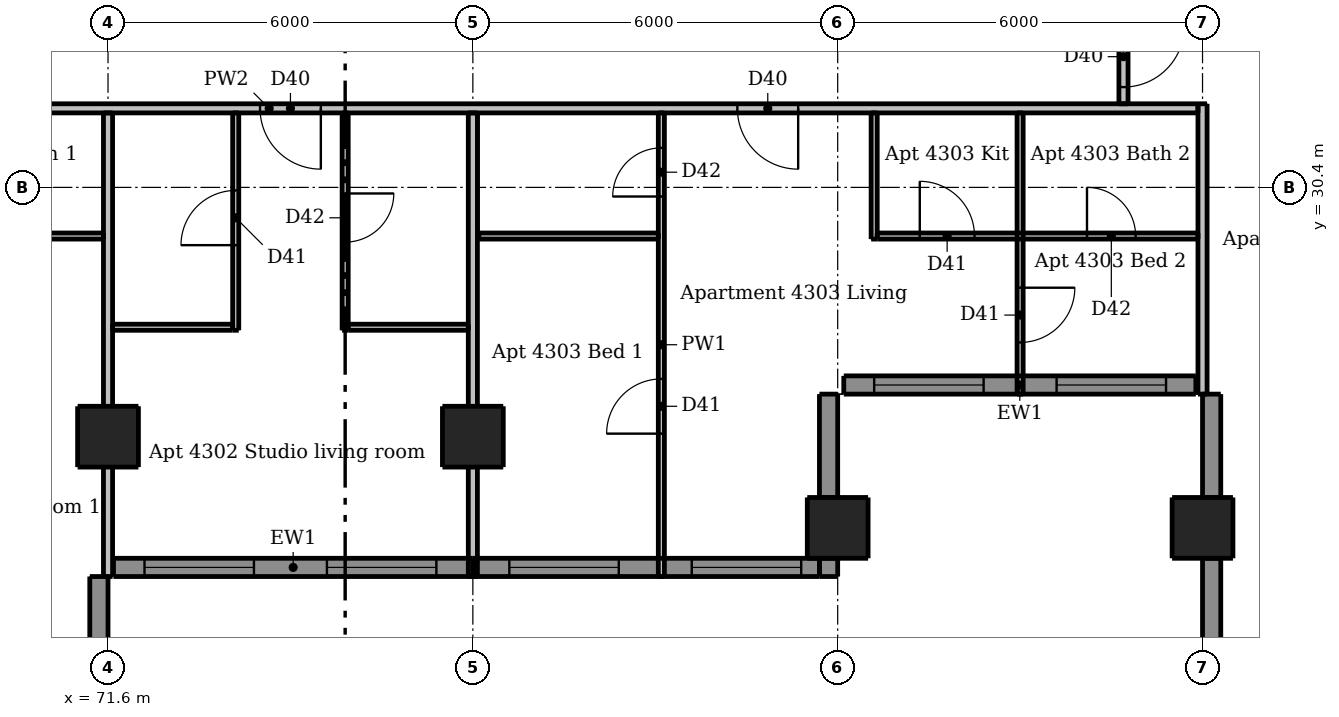
"""IFC4 building model, lengths in metres.
Left out: names, types, materials, properties, quantities, classifications, styles, units other than length and angle.
Written with IfcOpenShell. Run it as: python <this file> out.ifc"""

import sys

from ifc_helpers import new_model, si_unit, direction, frame, frame_2d, origin, origin_2d, place, context, subcontext, project, spatial, rectangle, extrude, element, fill, save


model = new_model("IFC4")
c1 = context("Model", 3, precision=1e-05, world=origin(), true_north=direction((0.0, 1.0)))
c2 = subcontext(c1, "Body", "Model", "MODEL_VIEW")
j1 = project(units=[si_unit("LENGTHUNIT", "METRE"), si_unit("PLANEANGLEUNIT", "RADIAN")], contexts=[c1])
p1 = place(None, origin())
s1 = spatial("IfcSite", under=j1, at=p1, CompositionType="ELEMENT")
p2 = place(p1, origin())
s2 = spatial("IfcBuilding", under=s1, at=p2, CompositionType="ELEMENT")
p3 = place(p2, frame((0.0, 0.0, 161.5)))
s3 = spatial("IfcBuildingStorey", under=s2, at=p3, CompositionType="ELEMENT", Elevation=161.5)
for number, where, z_axis, x_axis in (
    (1, (71.6, 26.3, 0.0), (0.0, 0.0, 1.0), (1.0, 0.0, 0.0)),
    (2, (77.6, 26.3, 0.0), (0.0, 0.0, 1.0), (1.0, 0.0, 0.0)),
):
    element("IfcColumn", number, at=place(p3, frame(where, z_axis=z_axis, x_axis=x_axis)), inside=s3, PredefinedType="COLUMN", context=c2, shape_type="SweptSolid", body=[
        extrude(rectangle(XDim=1.0, YDim=1.0, at=origin_2d()), origin(), (0.0, 0.0, 1.0), 3.05),
    ])
p4 = place(p3, frame((83.6, 24.8, 0.0), z_axis=(0.0, 0.0, 1.0), x_axis=(1.0, 0.0, 0.0)))
e3 = element("IfcColumn", 3, at=p4, inside=s3, PredefinedType="COLUMN", context=c2, shape_type="SweptSolid", body=[
    extrude(rectangle(XDim=1.0, YDim=1.0, at=origin_2d()), origin(), (0.0, 0.0, 1.0), 3.3),
])
p5 = place(p3, frame((89.6, 24.8, 0.0), z_axis=(0.0, 0.0, 1.0), x_axis=(1.0, 0.0, 0.0)))
e4 = element("IfcColumn", 4, at=p5, inside=s3, PredefinedType="COLUMN", context=c2, shape_type="SweptSolid", body=[
    extrude(rectangle(XDim=1.0, YDim=1.0, at=origin_2d()), origin(), (0.0, 0.0, 1.0), 3.05),
])
p6 = place(p3, frame((71.45, 22.5, 0.0), z_axis=(0.0, 0.0, 1.0), x_axis=(0.0, 1.0, 0.0)))
e5 = element("IfcWall", 5, at=p6, inside=s3, PredefinedType="SOLIDWALL", context=c2, shape_type="SweptSolid", body=[
    extrude(rectangle(XDim=1.5, YDim=0.3, at=frame_2d((0.75, 0.0))), origin(), (0.0, 0.0, 1.0), 3.05),
])
p7 = place(p3, frame((83.45, 24.0, 0.0), z_axis=(0.0, 0.0, 1.0), x_axis=(0.0, 1.0, 0.0)))
e6 = element("IfcWall", 6, at=p7, inside=s3, PredefinedType="SOLIDWALL", context=c2, shape_type="SweptSolid", body=[
    extrude(rectangle(XDim=0.3, YDim=0.3, at=frame_2d((0.15, 0.0))), origin(), (0.0, 0.0, 1.0), 3.05),
])
for number, where, z_axis, x_axis in (
    (7, (83.45, 25.3, 0.0), (0.0, 0.0, 1.0), (0.0, 1.0, 0.0)),
    (8, (89.75, 27.0, 0.0), (0.0, 0.0, 1.0), (0.0, -1.0, 0.0)),
):
    element("IfcWall", number, at=place(p3, frame(where, z_axis=z_axis, x_axis=x_axis)), inside=s3, PredefinedType="SOLIDWALL", context=c2, shape_type="SweptSolid", body=[
        extrude(rectangle(XDim=1.7, YDim=0.3, at=frame_2d((0.85, 0.0))), origin(), (0.0, 0.0, 1.0), 3.05),
    ])
p8 = place(p3, frame((89.75, 24.3, 0.0), z_axis=(0.0, 0.0, 1.0), x_axis=(0.0, -1.0, 0.0)))
e9 = element("IfcWall", 9, at=p8, inside=s3, PredefinedType="SOLIDWALL", context=c2, shape_type="SweptSolid", body=[
    extrude(rectangle(XDim=1.8, YDim=0.3, at=frame_2d((0.9, 0.0))), origin(), (0.0, 0.0, 1.0), 3.05),
])
p9 = place(p3, frame((71.69, 24.15, 0.0), z_axis=(0.0, 0.0, 1.0), x_axis=(1.0, 0.0, 0.0)))
e10 = element("IfcWall", 10, at=p9, inside=s3, PredefinedType="SOLIDWALL", context=c2, shape_type="SweptSolid", body=[
    extrude(rectangle(XDim=5.91, YDim=0.3, at=frame_2d((2.955, 0.0))), origin(), (0.0, 0.0, 1.0), 3.05),
])
p10 = place(p9, frame((0.51, 0.0, 0.15)))
e11 = element("IfcOpeningElement", 11, at=p10, cuts=e10, PredefinedType="OPENING", context=c2, shape_type="SweptSolid", body=[
    extrude(rectangle(XDim=1.8, YDim=2.1, at=frame_2d((0.9, 1.05))), frame((0.0, 0.16, 0.0), z_axis=(0.0, -1.0, 0.0), x_axis=(1.0, 0.0, 0.0)), (0.0, 0.0, 1.0), 0.32),
])
p11 = place(p9, frame((3.51, 0.0, 0.15)))
e12 = element("IfcOpeningElement", 12, at=p11, cuts=e10, PredefinedType="OPENING", context=c2, shape_type="SweptSolid", body=[
    extrude(rectangle(XDim=1.8, YDim=2.1, at=frame_2d((0.9, 1.05))), frame((0.0, 0.16, 0.0), z_axis=(0.0, -1.0, 0.0), x_axis=(1.0, 0.0, 0.0)), (0.0, 0.0, 1.0), 0.32),
])
p12 = place(p3, frame((77.6, 24.15, 0.0), z_axis=(0.0, 0.0, 1.0), x_axis=(1.0, 0.0, 0.0)))
e13 = element("IfcWall", 13, at=p12, inside=s3, PredefinedType="SOLIDWALL", context=c2, shape_type="SweptSolid", body=[
    extrude(rectangle(XDim=5.7, YDim=0.3, at=frame_2d((2.85, 0.0))), origin(), (0.0, 0.0, 1.0), 3.05),
])
p13 = place(p12, frame((0.6, 0.0, 0.15)))
e14 = element("IfcOpeningElement", 14, at=p13, cuts=e13, PredefinedType="OPENING", context=c2, shape_type="SweptSolid", body=[
    extrude(rectangle(XDim=1.8, YDim=2.1, at=frame_2d((0.9, 1.05))), frame((0.0, 0.16, 0.0), z_axis=(0.0, -1.0, 0.0), x_axis=(1.0, 0.0, 0.0)), (0.0, 0.0, 1.0), 0.32),
])
p14 = place(p12, frame((3.6, 0.0, 0.15)))
e15 = element("IfcOpeningElement", 15, at=p14, cuts=e13, PredefinedType="OPENING", context=c2, shape_type="SweptSolid", body=[
    extrude(rectangle(XDim=1.8, YDim=2.1, at=frame_2d((0.9, 1.05))), frame((0.0, 0.16, 0.0), z_axis=(0.0, -1.0, 0.0), x_axis=(1.0, 0.0, 0.0)), (0.0, 0.0, 1.0), 0.32),
])
p15 = place(p3, frame((83.7, 27.15, 0.0), z_axis=(0.0, 0.0, 1.0), x_axis=(1.0, 0.0, 0.0)))
e16 = element("IfcWall", 16, at=p15, inside=s3, PredefinedType="SOLIDWALL", context=c2, shape_type="SweptSolid", body=[
    extrude(rectangle(XDim=5.79, YDim=0.3, at=frame_2d((2.895, 0.0))), origin(), (0.0, 0.0, 1.0), 3.05),
])
p16 = place(p15, frame((0.5, 0.0, 0.15)))
e17 = element("IfcOpeningElement", 17, at=p16, cuts=e16, PredefinedType="OPENING", context=c2, shape_type="SweptSolid", body=[
    extrude(rectangle(XDim=1.8, YDim=2.1, at=frame_2d((0.9, 1.05))), frame((0.0, 0.16, 0.0), z_axis=(0.0, -1.0, 0.0), x_axis=(1.0, 0.0, 0.0)), (0.0, 0.0, 1.0), 0.32),
])
p17 = place(p15, frame((3.5, 0.0, 0.15)))
e18 = element("IfcOpeningElement", 18, at=p17, cuts=e16, PredefinedType="OPENING", context=c2, shape_type="SweptSolid", body=[
    extrude(rectangle(XDim=1.8, YDim=2.1, at=frame_2d((0.9, 1.05))), frame((0.0, 0.16, 0.0), z_axis=(0.0, -1.0, 0.0), x_axis=(1.0, 0.0, 0.0)), (0.0, 0.0, 1.0), 0.32),
])
p18 = place(p3, frame((73.7, 28.05, 0.0), z_axis=(0.0, 0.0, 1.0), x_axis=(0.0, 1.0, 0.0)))
e19 = element("IfcWall", 19, at=p18, inside=s3, PredefinedType="PARTITIONING", context=c2, shape_type="SweptSolid", body=[
    extrude(rectangle(XDim=3.575, YDim=0.1, at=frame_2d((1.788, 0.0))), origin(), (0.0, 0.0, 1.0), 3.05),
])
p19 = place(p18, frame((1.4, 0.0, 0.0)))
e20 = element("IfcOpeningElement", 20, at=p19, cuts=e19, PredefinedType="OPENING", context=c2, shape_type="SweptSolid", body=[
    extrude(rectangle(XDim=0.9, YDim=2.1, at=frame_2d((0.45, 1.05))), frame((0.0, 0.06, 0.0), z_axis=(0.0, -1.0, 0.0), x_axis=(1.0, 0.0, 0.0)), (0.0, 0.0, 1.0), 0.12),
])
p20 = place(p3, frame((75.5, 31.625, 0.0), z_axis=(0.0, 0.0, 1.0), x_axis=(0.0, -1.0, 0.0)))
e21 = element("IfcWall", 21, at=p20, inside=s3, PredefinedType="PARTITIONING", context=c2, shape_type="SweptSolid", body=[
    extrude(rectangle(XDim=3.575, YDim=0.1, at=frame_2d((1.788, 0.0))), origin(), (0.0, 0.0, 1.0), 3.05),
])
p21 = place(p20, frame((1.325, 0.0, 0.0)))
e22 = element("IfcOpeningElement", 22, at=p21, cuts=e21, PredefinedType="OPENING", context=c2, shape_type="SweptSolid", body=[
    extrude(rectangle(XDim=0.8, YDim=2.1, at=frame_2d((0.4, 1.05))), frame((0.0, 0.06, 0.0), z_axis=(0.0, -1.0, 0.0), x_axis=(1.0, 0.0, 0.0)), (0.0, 0.0, 1.0), 0.12),
])
p22 = place(p3, frame((80.7, 24.0, 0.0), z_axis=(0.0, 0.0, 1.0), x_axis=(0.0, 1.0, 0.0)))
e23 = element("IfcWall", 23, at=p22, inside=s3, PredefinedType="PARTITIONING", context=c2, shape_type="SweptSolid", body=[
    extrude(rectangle(XDim=7.625, YDim=0.1, at=frame_2d((3.812, 0.0))), origin(), (0.0, 0.0, 1.0), 3.05),
])
p23 = place(p22, frame((2.35, 0.0, 0.0)))
e24 = element("IfcOpeningElement", 24, at=p23, cuts=e23, PredefinedType="OPENING", context=c2, shape_type="SweptSolid", body=[
    extrude(rectangle(XDim=0.9, YDim=2.1, at=frame_2d((0.45, 1.05))), frame((0.0, 0.06, 0.0), z_axis=(0.0, -1.0, 0.0), x_axis=(1.0, 0.0, 0.0)), (0.0, 0.0, 1.0), 0.12),
])
p24 = place(p22, frame((6.25, 0.0, 0.0)))
e25 = element("IfcOpeningElement", 25, at=p24, cuts=e23, PredefinedType="OPENING", context=c2, shape_type="SweptSolid", body=[
    extrude(rectangle(XDim=0.8, YDim=2.1, at=frame_2d((0.4, 1.05))), frame((0.0, 0.06, 0.0), z_axis=(0.0, -1.0, 0.0), x_axis=(1.0, 0.0, 0.0)), (0.0, 0.0, 1.0), 0.12),
])
p25 = place(p3, frame((84.2, 29.55, 0.0), z_axis=(0.0, 0.0, 1.0), x_axis=(0.0, 1.0, 0.0)))
e26 = element("IfcWall", 26, at=p25, inside=s3, PredefinedType="PARTITIONING", context=c2, shape_type="SweptSolid", body=[
    extrude(rectangle(XDim=2.075, YDim=0.1, at=frame_2d((1.038, 0.0))), origin(), (0.0, 0.0, 1.0), 3.05),
])
p26 = place(p3, frame((86.6, 31.625, 0.0), z_axis=(0.0, 0.0, 1.0), x_axis=(0.0, -1.0, 0.0)))
e27 = element("IfcWall", 27, at=p26, inside=s3, PredefinedType="PARTITIONING", context=c2, shape_type="SweptSolid", body=[
    extrude(rectangle(XDim=4.625, YDim=0.1, at=frame_2d((2.312, 0.0))), origin(), (0.0, 0.0, 1.0), 3.05),
])
p27 = place(p26, frame((2.875, 0.0, 0.0)))
e28 = element("IfcOpeningElement", 28, at=p27, cuts=e27, PredefinedType="OPENING", context=c2, shape_type="SweptSolid", body=[
    extrude(rectangle(XDim=0.9, YDim=2.1, at=frame_2d((0.45, 1.05))), frame((0.0, 0.06, 0.0), z_axis=(0.0, -1.0, 0.0), x_axis=(1.0, 0.0, 0.0)), (0.0, 0.0, 1.0), 0.12),
])
p28 = place(p3, frame((65.65, 29.6, 0.0), z_axis=(0.0, 0.0, 1.0), x_axis=(1.0, 0.0, 0.0)))
e29 = element("IfcWall", 29, at=p28, inside=s3, PredefinedType="PARTITIONING", context=c2, shape_type="SweptSolid", body=[
    extrude(rectangle(XDim=5.875, YDim=0.1, at=frame_2d((2.938, 0.0))), origin(), (0.0, 0.0, 1.0), 3.05),
])
p29 = place(p28, frame((3.75, 0.0, 0.0)))
e30 = element("IfcOpeningElement", 30, at=p29, cuts=e29, PredefinedType="OPENING", context=c2, shape_type="SweptSolid", body=[
    extrude(rectangle(XDim=0.8, YDim=2.1, at=frame_2d((0.4, 1.05))), frame((0.0, 0.06, 0.0), z_axis=(0.0, -1.0, 0.0), x_axis=(1.0, 0.0, 0.0)), (0.0, 0.0, 1.0), 0.12),
])
p30 = place(p3, frame((77.7, 29.6, 0.0), z_axis=(0.0, 0.0, 1.0), x_axis=(1.0, 0.0, 0.0)))
e31 = element("IfcWall", 31, at=p30, inside=s3, PredefinedType="PARTITIONING", context=c2, shape_type="SweptSolid", body=[
    extrude(rectangle(XDim=2.95, YDim=0.1, at=frame_2d((1.475, 0.0))), origin(), (0.0, 0.0, 1.0), 3.05),
])
p31 = place(p3, frame((84.25, 29.6, 0.0), z_axis=(0.0, 0.0, 1.0), x_axis=(1.0, 0.0, 0.0)))
e32 = element("IfcWall", 32, at=p31, inside=s3, PredefinedType="PARTITIONING", context=c2, shape_type="SweptSolid", body=[
    extrude(rectangle(XDim=5.275, YDim=0.1, at=frame_2d((2.637, 0.0))), origin(), (0.0, 0.0, 1.0), 3.05),
])
p32 = place(p31, frame((0.7, 0.0, 0.0)))
e33 = element("IfcOpeningElement", 33, at=p32, cuts=e32, PredefinedType="OPENING", context=c2, shape_type="SweptSolid", body=[
    extrude(rectangle(XDim=0.9, YDim=2.1, at=frame_2d((0.45, 1.05))), frame((0.0, 0.06, 0.0), z_axis=(0.0, -1.0, 0.0), x_axis=(1.0, 0.0, 0.0)), (0.0, 0.0, 1.0), 0.12),
])
p33 = place(p31, frame((3.45, 0.0, 0.0)))
e34 = element("IfcOpeningElement", 34, at=p33, cuts=e32, PredefinedType="OPENING", context=c2, shape_type="SweptSolid", body=[
    extrude(rectangle(XDim=0.8, YDim=2.1, at=frame_2d((0.4, 1.05))), frame((0.0, 0.06, 0.0), z_axis=(0.0, -1.0, 0.0), x_axis=(1.0, 0.0, 0.0)), (0.0, 0.0, 1.0), 0.12),
])
for number, where, z_axis, x_axis in (
    (35, (71.675, 28.1, 0.0), (0.0, 0.0, 1.0), (1.0, 0.0, 0.0)),
    (36, (75.55, 28.1, 0.0), (0.0, 0.0, 1.0), (1.0, 0.0, 0.0)),
):
    element("IfcWall", number, at=place(p3, frame(where, z_axis=z_axis, x_axis=x_axis)), inside=s3, PredefinedType="PARTITIONING", context=c2, shape_type="SweptSolid", body=[
        extrude(rectangle(XDim=1.975, YDim=0.1, at=frame_2d((0.987, 0.0))), origin(), (0.0, 0.0, 1.0), 3.05),
    ])
for number, where, z_axis, x_axis in (
    (37, (71.6, 24.0, 0.0), (0.0, 0.0, 1.0), (0.0, 1.0, 0.0)),
    (38, (77.6, 24.0, 0.0), (0.0, 0.0, 1.0), (0.0, 1.0, 0.0)),
):
    element("IfcWall", number, at=place(p3, frame(where, z_axis=z_axis, x_axis=x_axis)), inside=s3, PredefinedType="PARTITIONING", context=c2, shape_type="SweptSolid", body=[
        extrude(rectangle(XDim=7.625, YDim=0.15, at=frame_2d((3.812, 0.0))), origin(), (0.0, 0.0, 1.0), 2.59),
    ])
p34 = place(p3, frame((88.3, 61.175, 0.0), z_axis=(0.0, 0.0, 1.0), x_axis=(0.0, -1.0, 0.0)))
e39 = element("IfcWall", 39, at=p34, inside=s3, PredefinedType="PARTITIONING", context=c2, shape_type="SweptSolid", body=[
    extrude(rectangle(XDim=29.4, YDim=0.15, at=frame_2d((14.7, 0.0))), origin(), (0.0, 0.0, 1.0), 3.05),
])
p35 = place(p34, frame((28.125, 0.0, 0.0)))
e40 = element("IfcOpeningElement", 40, at=p35, cuts=e39, PredefinedType="OPENING", context=c2, shape_type="SweptSolid", body=[
    extrude(rectangle(XDim=1.0, YDim=2.1, at=frame_2d((0.5, 1.05))), frame((0.0, 0.085, 0.0), z_axis=(0.0, -1.0, 0.0), x_axis=(1.0, 0.0, 0.0)), (0.0, 0.0, 1.0), 0.17),
])
p36 = place(p34, frame((18.275, 0.0, 0.0)))
e41 = element("IfcOpeningElement", 41, at=p36, cuts=e39, PredefinedType="OPENING", context=c2, shape_type="SweptSolid", body=[
    extrude(rectangle(XDim=1.0, YDim=2.1, at=frame_2d((0.5, 1.05))), frame((0.0, 0.085, 0.0), z_axis=(0.0, -1.0, 0.0), x_axis=(1.0, 0.0, 0.0)), (0.0, 0.0, 1.0), 0.17),
])
p37 = place(p34, frame((10.475, 0.0, 0.0)))
e42 = element("IfcOpeningElement", 42, at=p37, cuts=e39, PredefinedType="OPENING", context=c2, shape_type="SweptSolid", body=[
    extrude(rectangle(XDim=1.0, YDim=2.1, at=frame_2d((0.5, 1.05))), frame((0.0, 0.085, 0.0), z_axis=(0.0, -1.0, 0.0), x_axis=(1.0, 0.0, 0.0)), (0.0, 0.0, 1.0), 0.17),
])
p38 = place(p34, frame((3.275, 0.0, 0.0)))
e43 = element("IfcOpeningElement", 43, at=p38, cuts=e39, PredefinedType="OPENING", context=c2, shape_type="SweptSolid", body=[
    extrude(rectangle(XDim=1.0, YDim=2.1, at=frame_2d((0.5, 1.05))), frame((0.0, 0.085, 0.0), z_axis=(0.0, -1.0, 0.0), x_axis=(1.0, 0.0, 0.0)), (0.0, 0.0, 1.0), 0.17),
])
p39 = place(p3, frame((89.6, 27.0, 0.0), z_axis=(0.0, 0.0, 1.0), x_axis=(0.0, 1.0, 0.0)))
e44 = element("IfcWall", 44, at=p39, inside=s3, PredefinedType="PARTITIONING", context=c2, shape_type="SweptSolid", body=[
    extrude(rectangle(XDim=4.775, YDim=0.15, at=frame_2d((2.387, 0.0))), origin(), (0.0, 0.0, 1.0), 2.51),
])
p40 = place(p3, frame((89.525, 31.7, 0.0), z_axis=(0.0, 0.0, 1.0), x_axis=(-1.0, 0.0, 0.0)))
e45 = element("IfcWall", 45, at=p40, inside=s3, PredefinedType="PARTITIONING", context=c2, shape_type="SweptSolid", body=[
    extrude(rectangle(XDim=30.55, YDim=0.15, at=frame_2d((15.275, 0.0))), origin(), (0.0, 0.0, 1.0), 3.05),
])
p41 = place(p40, frame((26.775, 0.0, 0.0)))
e46 = element("IfcOpeningElement", 46, at=p41, cuts=e45, PredefinedType="OPENING", context=c2, shape_type="SweptSolid", body=[
    extrude(rectangle(XDim=1.0, YDim=2.1, at=frame_2d((0.5, 1.05))), frame((0.0, 0.085, 0.0), z_axis=(0.0, -1.0, 0.0), x_axis=(1.0, 0.0, 0.0)), (0.0, 0.0, 1.0), 0.17),
])
p42 = place(p40, frame((14.425, 0.0, 0.0)))
e47 = element("IfcOpeningElement", 47, at=p42, cuts=e45, PredefinedType="OPENING", context=c2, shape_type="SweptSolid", body=[
    extrude(rectangle(XDim=1.0, YDim=2.1, at=frame_2d((0.5, 1.05))), frame((0.0, 0.085, 0.0), z_axis=(0.0, -1.0, 0.0), x_axis=(1.0, 0.0, 0.0)), (0.0, 0.0, 1.0), 0.17),
])
p43 = place(p40, frame((6.575, 0.0, 0.0)))
e48 = element("IfcOpeningElement", 48, at=p43, cuts=e45, PredefinedType="OPENING", context=c2, shape_type="SweptSolid", body=[
    extrude(rectangle(XDim=1.0, YDim=2.1, at=frame_2d((0.5, 1.05))), frame((0.0, 0.085, 0.0), z_axis=(0.0, -1.0, 0.0), x_axis=(1.0, 0.0, 0.0)), (0.0, 0.0, 1.0), 0.17),
])
p44 = place(p10, origin())
e49 = element("IfcWindow", 49, at=p44, inside=s3, PartitioningType="DOUBLE_PANEL_VERTICAL", PredefinedType="WINDOW", context=c2, shape_type="SweptSolid", body=[
    extrude(rectangle(XDim=1.8, YDim=2.1, at=frame_2d((0.9, 1.05))), frame((0.0, 0.03, 0.0), z_axis=(0.0, -1.0, 0.0), x_axis=(1.0, 0.0, 0.0)), (0.0, 0.0, 1.0), 0.06),
])
fill(e11, e49)
p45 = place(p11, origin())
e50 = element("IfcWindow", 50, at=p45, inside=s3, PartitioningType="DOUBLE_PANEL_VERTICAL", PredefinedType="WINDOW", context=c2, shape_type="SweptSolid", body=[
    extrude(rectangle(XDim=1.8, YDim=2.1, at=frame_2d((0.9, 1.05))), frame((0.0, 0.03, 0.0), z_axis=(0.0, -1.0, 0.0), x_axis=(1.0, 0.0, 0.0)), (0.0, 0.0, 1.0), 0.06),
])
fill(e12, e50)
p46 = place(p13, origin())
e51 = element("IfcWindow", 51, at=p46, inside=s3, PartitioningType="DOUBLE_PANEL_VERTICAL", PredefinedType="WINDOW", context=c2, shape_type="SweptSolid", body=[
    extrude(rectangle(XDim=1.8, YDim=2.1, at=frame_2d((0.9, 1.05))), frame((0.0, 0.03, 0.0), z_axis=(0.0, -1.0, 0.0), x_axis=(1.0, 0.0, 0.0)), (0.0, 0.0, 1.0), 0.06),
])
fill(e14, e51)
p47 = place(p14, origin())
e52 = element("IfcWindow", 52, at=p47, inside=s3, PartitioningType="DOUBLE_PANEL_VERTICAL", PredefinedType="WINDOW", context=c2, shape_type="SweptSolid", body=[
    extrude(rectangle(XDim=1.8, YDim=2.1, at=frame_2d((0.9, 1.05))), frame((0.0, 0.03, 0.0), z_axis=(0.0, -1.0, 0.0), x_axis=(1.0, 0.0, 0.0)), (0.0, 0.0, 1.0), 0.06),
])
fill(e15, e52)
p48 = place(p16, origin())
e53 = element("IfcWindow", 53, at=p48, inside=s3, PartitioningType="DOUBLE_PANEL_VERTICAL", PredefinedType="WINDOW", context=c2, shape_type="SweptSolid", body=[
    extrude(rectangle(XDim=1.8, YDim=2.1, at=frame_2d((0.9, 1.05))), frame((0.0, 0.03, 0.0), z_axis=(0.0, -1.0, 0.0), x_axis=(1.0, 0.0, 0.0)), (0.0, 0.0, 1.0), 0.06),
])
fill(e17, e53)
p49 = place(p17, origin())
e54 = element("IfcWindow", 54, at=p49, inside=s3, PartitioningType="DOUBLE_PANEL_VERTICAL", PredefinedType="WINDOW", context=c2, shape_type="SweptSolid", body=[
    extrude(rectangle(XDim=1.8, YDim=2.1, at=frame_2d((0.9, 1.05))), frame((0.0, 0.03, 0.0), z_axis=(0.0, -1.0, 0.0), x_axis=(1.0, 0.0, 0.0)), (0.0, 0.0, 1.0), 0.06),
])
fill(e18, e54)
p50 = place(p42, origin())
e55 = element("IfcDoor", 55, at=p50, inside=s3, OperationType="SINGLE_SWING_LEFT", PredefinedType="DOOR", context=c2, shape_type="SweptSolid", body=[
    extrude(rectangle(XDim=1.0, YDim=2.1, at=frame_2d((0.5, 1.05))), frame((0.0, 0.025, 0.0), z_axis=(0.0, -1.0, 0.0), x_axis=(1.0, 0.0, 0.0)), (0.0, 0.0, 1.0), 0.05),
])
fill(e47, e55)
p51 = place(p19, origin())
e56 = element("IfcDoor", 56, at=p51, inside=s3, OperationType="SINGLE_SWING_LEFT", PredefinedType="DOOR", context=c2, shape_type="SweptSolid", body=[
    extrude(rectangle(XDim=0.9, YDim=2.1, at=frame_2d((0.45, 1.05))), frame((0.0, 0.025, 0.0), z_axis=(0.0, -1.0, 0.0), x_axis=(1.0, 0.0, 0.0)), (0.0, 0.0, 1.0), 0.05),
])
fill(e20, e56)
p52 = place(p21, origin())
e57 = element("IfcDoor", 57, at=p52, inside=s3, OperationType="SINGLE_SWING_LEFT", PredefinedType="DOOR", context=c2, shape_type="SweptSolid", body=[
    extrude(rectangle(XDim=0.8, YDim=2.1, at=frame_2d((0.4, 1.05))), frame((0.0, 0.025, 0.0), z_axis=(0.0, -1.0, 0.0), x_axis=(1.0, 0.0, 0.0)), (0.0, 0.0, 1.0), 0.05),
])
fill(e22, e57)
p53 = place(p43, origin())
e58 = element("IfcDoor", 58, at=p53, inside=s3, OperationType="SINGLE_SWING_LEFT", PredefinedType="DOOR", context=c2, shape_type="SweptSolid", body=[
    extrude(rectangle(XDim=1.0, YDim=2.1, at=frame_2d((0.5, 1.05))), frame((0.0, 0.025, 0.0), z_axis=(0.0, -1.0, 0.0), x_axis=(1.0, 0.0, 0.0)), (0.0, 0.0, 1.0), 0.05),
])
fill(e48, e58)
p54 = place(p32, origin())
e59 = element("IfcDoor", 59, at=p54, inside=s3, OperationType="SINGLE_SWING_LEFT", PredefinedType="DOOR", context=c2, shape_type="SweptSolid", body=[
    extrude(rectangle(XDim=0.9, YDim=2.1, at=frame_2d((0.45, 1.05))), frame((0.0, 0.025, 0.0), z_axis=(0.0, -1.0, 0.0), x_axis=(1.0, 0.0, 0.0)), (0.0, 0.0, 1.0), 0.05),
])
fill(e33, e59)
p55 = place(p23, origin())
e60 = element("IfcDoor", 60, at=p55, inside=s3, OperationType="SINGLE_SWING_LEFT", PredefinedType="DOOR", context=c2, shape_type="SweptSolid", body=[
    extrude(rectangle(XDim=0.9, YDim=2.1, at=frame_2d((0.45, 1.05))), frame((0.0, 0.025, 0.0), z_axis=(0.0, -1.0, 0.0), x_axis=(1.0, 0.0, 0.0)), (0.0, 0.0, 1.0), 0.05),
])
fill(e24, e60)
p56 = place(p24, origin())
e61 = element("IfcDoor", 61, at=p56, inside=s3, OperationType="SINGLE_SWING_LEFT", PredefinedType="DOOR", context=c2, shape_type="SweptSolid", body=[
    extrude(rectangle(XDim=0.8, YDim=2.1, at=frame_2d((0.4, 1.05))), frame((0.0, 0.025, 0.0), z_axis=(0.0, -1.0, 0.0), x_axis=(1.0, 0.0, 0.0)), (0.0, 0.0, 1.0), 0.05),
])
fill(e25, e61)
p57 = place(p27, origin())
e62 = element("IfcDoor", 62, at=p57, inside=s3, OperationType="SINGLE_SWING_LEFT", PredefinedType="DOOR", context=c2, shape_type="SweptSolid", body=[
    extrude(rectangle(XDim=0.9, YDim=2.1, at=frame_2d((0.45, 1.05))), frame((0.0, 0.025, 0.0), z_axis=(0.0, -1.0, 0.0), x_axis=(1.0, 0.0, 0.0)), (0.0, 0.0, 1.0), 0.05),
])
fill(e28, e62)
p58 = place(p33, origin())
e63 = element("IfcDoor", 63, at=p58, inside=s3, OperationType="SINGLE_SWING_LEFT", PredefinedType="DOOR", context=c2, shape_type="SweptSolid", body=[
    extrude(rectangle(XDim=0.8, YDim=2.1, at=frame_2d((0.4, 1.05))), frame((0.0, 0.025, 0.0), z_axis=(0.0, -1.0, 0.0), x_axis=(1.0, 0.0, 0.0)), (0.0, 0.0, 1.0), 0.05),
])
fill(e34, e63)
p59 = place(p35, origin())
e64 = element("IfcDoor", 64, at=p59, inside=s3, OperationType="SINGLE_SWING_LEFT", PredefinedType="DOOR", context=c2, shape_type="SweptSolid", body=[
    extrude(rectangle(XDim=1.0, YDim=2.1, at=frame_2d((0.5, 1.05))), frame((0.0, 0.025, 0.0), z_axis=(0.0, -1.0, 0.0), x_axis=(1.0, 0.0, 0.0)), (0.0, 0.0, 1.0), 0.05),
])
fill(e40, e64)
save(model, sys.argv[1])
